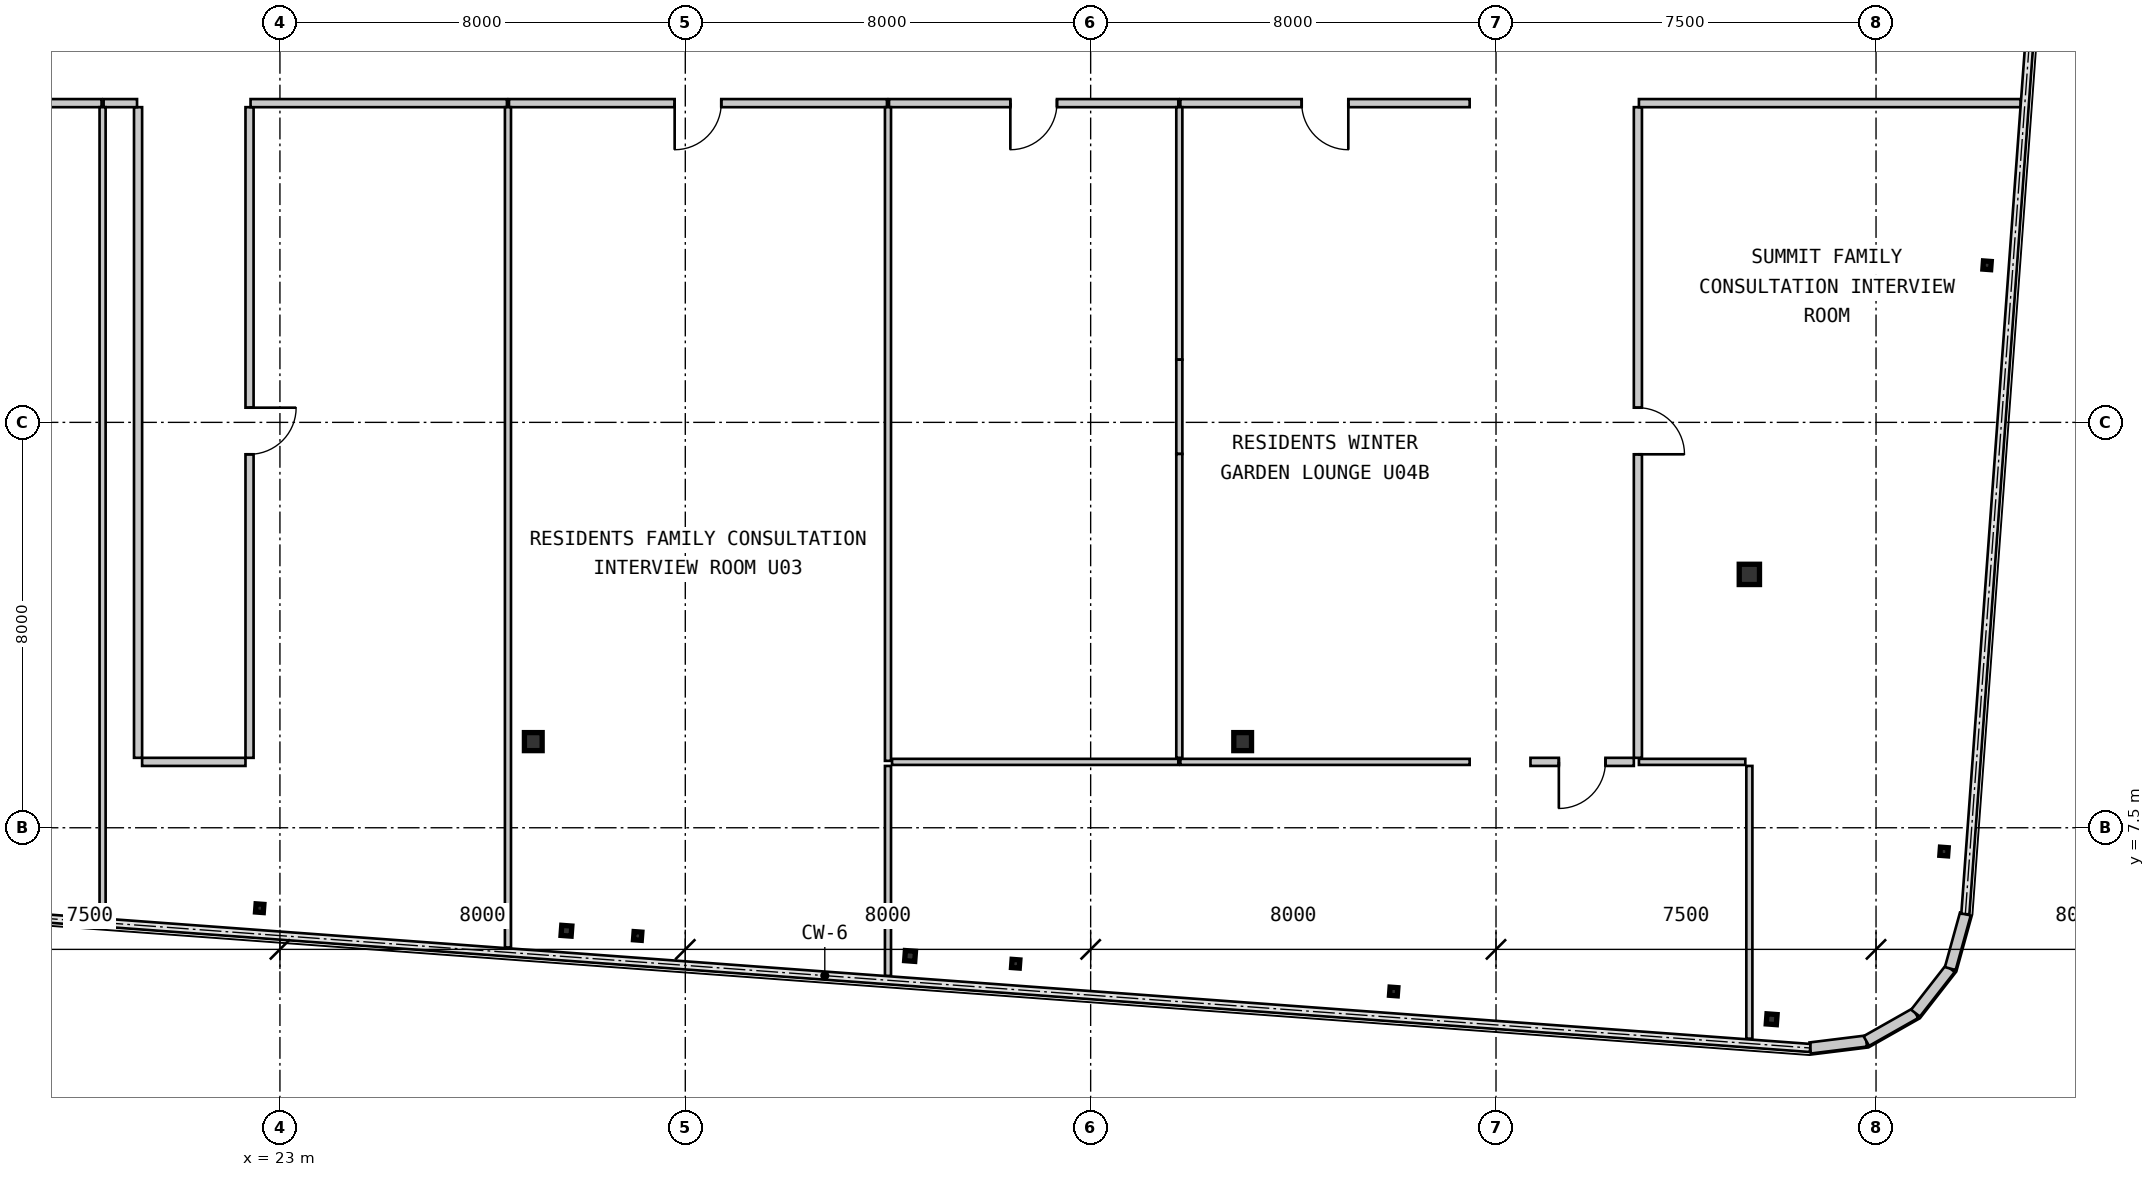
"""IFC4 building model, lengths in metres.
Left out: names, types, materials, properties, quantities, classifications, styles, units other than length and angle.
Written with IfcOpenShell. Run it as: python <this file> out.ifc"""

import sys

from ifc_helpers import new_model, si_unit, direction, frame, frame_2d, origin, origin_2d, place, context, subcontext, project, spatial, rectangle, hollow_rectangle, i_section, extrude, source, transform, mapped, element, fill, save


model = new_model("IFC4")
c1 = context("Model", 3, precision=1e-05, world=origin(), true_north=direction((0.0, 1.0)))
c2 = subcontext(c1, "Body", "Model", "MODEL_VIEW")
j1 = project(units=[si_unit("LENGTHUNIT", "METRE"), si_unit("PLANEANGLEUNIT", "RADIAN")], contexts=[c1])
p1 = place(None, origin())
s1 = spatial("IfcSite", under=j1, at=p1, CompositionType="ELEMENT")
p2 = place(p1, origin())
s2 = spatial("IfcBuilding", under=s1, at=p2, CompositionType="ELEMENT")
p3 = place(p2, frame((0.0, 0.0, 246.05)))
s3 = spatial("IfcBuildingStorey", under=s2, at=p3, CompositionType="ELEMENT", Elevation=246.05)
m1 = source(origin(), c2, "Body", "SweptSolid", [
    extrude(i_section(OverallWidth=0.35, OverallDepth=0.356, WebThickness=0.018, FlangeThickness=0.028, at=origin_2d()), origin(), (0.0, 0.0, 1.0), 3.15),
])
for number, where, z_axis, x_axis in (
    (1, (28.0, 9.2, 0.0), (0.0, 0.0, 1.0), (1.0, 0.0, 0.0)),
    (2, (42.0, 9.2, 0.0), (0.0, 0.0, 1.0), (1.0, 0.0, 0.0)),
):
    element("IfcColumn", number, at=place(p3, frame(where, z_axis=z_axis, x_axis=x_axis)), inside=s3, PredefinedType="COLUMN", context=c2, shape_type="MappedRepresentation", body=[
        mapped(m1, transform((0.0, 0.0, 0.0), scale=1.0)),
    ])
m2 = source(origin(), c2, "Body", "SweptSolid", [
    extrude(hollow_rectangle(XDim=0.4, YDim=0.4, WallThickness=0.016, at=origin_2d()), origin(), (0.0, 0.0, 1.0), 3.15),
])
p4 = place(p3, frame((52.0, 12.5, 0.0), z_axis=(0.0, 0.0, 1.0), x_axis=(1.0, 0.0, 0.0)))
e3 = element("IfcColumn", 3, at=p4, inside=s3, PredefinedType="COLUMN", context=c2, shape_type="MappedRepresentation", body=[
    mapped(m2, transform((0.0, 0.0, 0.0), scale=1.0)),
])
m3 = source(origin(), c2, "Body", "SweptSolid", [
    extrude(i_section(OverallWidth=0.154, OverallDepth=0.162, WebThickness=0.008, FlangeThickness=0.011, at=origin_2d()), origin(), (0.0, 0.0, 1.0), 3.15),
])
for number, where, z_axis, x_axis in (
    (4, (22.601, 5.912, 0.0), (0.0, 0.0, 1.0), (0.997, -0.073, 0.0)),
    (5, (30.061, 5.365, 0.0), (0.0, 0.0, 1.0), (0.997, -0.073, 0.0)),
    (6, (37.521, 4.817, 0.0), (0.0, 0.0, 1.0), (0.997, -0.073, 0.0)),
    (7, (44.98, 4.269, 0.0), (0.0, 0.0, 1.0), (0.997, -0.073, 0.0)),
):
    element("IfcColumn", number, at=place(p3, frame(where, z_axis=z_axis, x_axis=x_axis)), inside=s3, PredefinedType="COLUMN", context=c2, shape_type="MappedRepresentation", body=[
        mapped(m3, transform((0.0, 0.0, 0.0), scale=1.0)),
    ])
m4 = source(origin(), c2, "Body", "SweptSolid", [
    extrude(hollow_rectangle(XDim=0.2, YDim=0.2, WallThickness=0.009, at=origin_2d()), origin(), (0.0, 0.0, 1.0), 3.15),
])
p5 = place(p3, frame((52.44, 3.721, 0.0), z_axis=(0.0, 0.0, 1.0), x_axis=(0.997314477224, -0.073238197128, 0.0)))
e8 = element("IfcColumn", 8, at=p5, inside=s3, PredefinedType="COLUMN", context=c2, shape_type="MappedRepresentation", body=[
    mapped(m4, transform((0.0, 0.0, 0.0), scale=1.0)),
])
for number, where, z_axis, x_axis in (
    (9, (55.842, 7.031, 0.0), (0.0, 0.0, 1.0), (0.997, -0.073, 0.0)),
    (10, (56.691, 18.6, 0.0), (0.0, 0.0, 1.0), (0.997, -0.073, 0.0)),
):
    element("IfcColumn", number, at=place(p3, frame(where, z_axis=z_axis, x_axis=x_axis)), inside=s3, PredefinedType="COLUMN", context=c2, shape_type="MappedRepresentation", body=[
        mapped(m3, transform((0.0, 0.0, 0.0), scale=1.0)),
    ])
for number, where, z_axis, x_axis in (
    (11, (28.654, 5.468, 0.0), (0.0, 0.0, 1.0), (0.997, -0.073, 0.0)),
    (12, (35.436, 4.97, 0.0), (0.0, 0.0, 1.0), (0.997, -0.073, 0.0)),
):
    element("IfcColumn", number, at=place(p3, frame(where, z_axis=z_axis, x_axis=x_axis)), inside=s3, PredefinedType="COLUMN", context=c2, shape_type="MappedRepresentation", body=[
        mapped(m4, transform((0.0, 0.0, 0.0), scale=1.0)),
    ])
m5 = source(origin(), c2, "Body", "SweptSolid", [
    extrude(rectangle(XDim=1.116, YDim=0.22, at=frame_2d((0.558, 0.0))), origin(), (0.0, 0.0, 1.0), 2.93),
])
p6 = place(p3, frame((53.201, 3.154, 0.0), z_axis=(0.0, 0.0, 1.0), x_axis=(0.992438604032, 0.122742076028, 0.0)))
e13 = element("IfcWall", 13, at=p6, inside=s3, PredefinedType="SOLIDWALL", context=c2, shape_type="MappedRepresentation", body=[
    mapped(m5, transform((0.0, 0.0, 0.0), scale=1.0)),
])
m6 = source(origin(), c2, "Body", "SweptSolid", [
    extrude(rectangle(XDim=1.116, YDim=0.22, at=frame_2d((0.558, 0.0))), origin(), (0.0, 0.0, 1.0), 2.93),
])
p7 = place(p3, frame((54.308, 3.291, 0.0), z_axis=(0.0, 0.0, 1.0), x_axis=(0.869893934693, 0.49323882895, 0.0)))
e14 = element("IfcWall", 14, at=p7, inside=s3, PredefinedType="SOLIDWALL", context=c2, shape_type="MappedRepresentation", body=[
    mapped(m6, transform((0.0, 0.0, 0.0), scale=1.0)),
])
for number, where, z_axis, x_axis in (
    (15, (55.279, 3.841, 0.0), (0.0, 0.0, 1.0), (0.615, 0.789, 0.0)),
    (16, (55.965, 4.721, 0.0), (0.0, 0.0, 1.0), (0.266, 0.964, 0.0)),
):
    element("IfcWall", number, at=place(p3, frame(where, z_axis=z_axis, x_axis=x_axis)), inside=s3, PredefinedType="SOLIDWALL", context=c2, shape_type="MappedRepresentation", body=[
        mapped(m5, transform((0.0, 0.0, 0.0), scale=1.0)),
    ])
m7 = source(origin(), c2, "Body", "SweptSolid", [
    extrude(rectangle(XDim=2.04, YDim=0.16, at=frame_2d((1.02, 0.0))), origin(), (0.0, 0.0, 1.0), 2.93),
])
p8 = place(p3, frame((49.72, 8.8, 0.0), z_axis=(0.0, 0.0, 1.0), x_axis=(-1.0, 0.0, 0.0)))
e17 = element("IfcWall", 17, at=p8, inside=s3, PredefinedType="PARTITIONING", context=c2, shape_type="MappedRepresentation", body=[
    mapped(m7, transform((0.0, 0.0, 0.0), scale=1.0)),
])
m8 = source(origin(), c2, "Body", "SweptSolid", [
    extrude(rectangle(XDim=0.92, YDim=2.1, at=frame_2d((0.46, 1.05))), frame((0.0, 0.09, 0.0), z_axis=(0.0, -1.0, 0.0), x_axis=(1.0, 0.0, 0.0)), (0.0, 0.0, 1.0), 0.18),
])
p9 = place(p8, frame((0.56, 0.0, 0.0)))
e18 = element("IfcOpeningElement", 18, at=p9, cuts=e17, PredefinedType="OPENING", context=c2, shape_type="MappedRepresentation", body=[
    mapped(m8, transform((0.0, 0.0, 0.0), scale=1.0)),
])
m9 = source(origin(), c2, "Body", "SweptSolid", [
    extrude(rectangle(XDim=6.786, YDim=0.16, at=frame_2d((3.393, 0.0))), origin(), (0.0, 0.0, 1.0), 2.93),
])
p10 = place(p3, frame((19.48, 21.8, 0.0), z_axis=(0.0, 0.0, 1.0), x_axis=(-1.0, 0.0, 0.0)))
e19 = element("IfcWall", 19, at=p10, inside=s3, PredefinedType="PARTITIONING", context=c2, shape_type="MappedRepresentation", body=[
    mapped(m9, transform((0.0, 0.0, 0.0), scale=1.0)),
])
p11 = place(p10, frame((2.933, 0.0, 0.0)))
e20 = element("IfcOpeningElement", 20, at=p11, cuts=e19, PredefinedType="OPENING", context=c2, shape_type="MappedRepresentation", body=[
    mapped(m8, transform((0.0, 0.0, 0.0), scale=1.0)),
])
m10 = source(origin(), c2, "Body", "SweptSolid", [
    extrude(rectangle(XDim=12.84, YDim=0.16, at=frame_2d((6.42, 0.0))), origin(), (0.0, 0.0, 1.0), 2.93),
])
p12 = place(p3, frame((20.2, 8.88, 0.0), z_axis=(0.0, 0.0, 1.0), x_axis=(0.0, 1.0, 0.0)))
e21 = element("IfcWall", 21, at=p12, inside=s3, PredefinedType="PARTITIONING", context=c2, shape_type="MappedRepresentation", body=[
    mapped(m10, transform((0.0, 0.0, 0.0), scale=1.0)),
])
p13 = place(p3, frame((22.4, 21.72, 0.0), z_axis=(0.0, 0.0, 1.0), x_axis=(0.0, -1.0, 0.0)))
e22 = element("IfcWall", 22, at=p13, inside=s3, PredefinedType="PARTITIONING", context=c2, shape_type="MappedRepresentation", body=[
    mapped(m10, transform((0.0, 0.0, 0.0), scale=1.0)),
])
p14 = place(p13, frame((5.93, 0.0, 0.0)))
e23 = element("IfcOpeningElement", 23, at=p14, cuts=e22, PredefinedType="OPENING", context=c2, shape_type="MappedRepresentation", body=[
    mapped(m8, transform((0.0, 0.0, 0.0), scale=1.0)),
])
m11 = source(origin(), c2, "Body", "SweptSolid", [
    extrude(rectangle(XDim=5.06, YDim=0.16, at=frame_2d((2.53, 0.0))), origin(), (0.0, 0.0, 1.0), 2.93),
])
p15 = place(p3, frame((27.48, 21.8, 0.0), z_axis=(0.0, 0.0, 1.0), x_axis=(-1.0, 0.0, 0.0)))
e24 = element("IfcWall", 24, at=p15, inside=s3, PredefinedType="PARTITIONING", context=c2, shape_type="MappedRepresentation", body=[
    mapped(m11, transform((0.0, 0.0, 0.0), scale=1.0)),
])
p16 = place(p3, frame((22.32, 8.8, 0.0), z_axis=(0.0, 0.0, 1.0), x_axis=(-1.0, 0.0, 0.0)))
e25 = element("IfcWall", 25, at=p16, inside=s3, PredefinedType="PARTITIONING", context=c2, shape_type="MappedRepresentation", body=[
    mapped(m7, transform((0.0, 0.0, 0.0), scale=1.0)),
])
m12 = source(origin(), c2, "Body", "SweptSolid", [
    extrude(rectangle(XDim=0.659, YDim=0.16, at=frame_2d((0.33, 0.0))), origin(), (0.0, 0.0, 1.0), 2.93),
])
p17 = place(p3, frame((20.18, 21.8, 0.0), z_axis=(0.0, 0.0, 1.0), x_axis=(-1.0, 0.0, 0.0)))
e26 = element("IfcWall", 26, at=p17, inside=s3, PredefinedType="PARTITIONING", context=c2, shape_type="MappedRepresentation", body=[
    mapped(m12, transform((0.0, 0.0, 0.0), scale=1.0)),
])
m13 = source(origin(), c2, "Body", "SweptSolid", [
    extrude(rectangle(XDim=7.459, YDim=0.16, at=frame_2d((3.73, 0.0))), origin(), (0.0, 0.0, 1.0), 2.93),
])
p18 = place(p3, frame((34.98, 21.8, 0.0), z_axis=(0.0, 0.0, 1.0), x_axis=(-1.0, 0.0, 0.0)))
e27 = element("IfcWall", 27, at=p18, inside=s3, PredefinedType="PARTITIONING", context=c2, shape_type="MappedRepresentation", body=[
    mapped(m13, transform((0.0, 0.0, 0.0), scale=1.0)),
])
p19 = place(p18, frame((3.27, 0.0, 0.0)))
e28 = element("IfcOpeningElement", 28, at=p19, cuts=e27, PredefinedType="OPENING", context=c2, shape_type="MappedRepresentation", body=[
    mapped(m8, transform((0.0, 0.0, 0.0), scale=1.0)),
])
m14 = source(origin(), c2, "Body", "SweptSolid", [
    extrude(rectangle(XDim=5.709, YDim=0.16, at=frame_2d((2.855, 0.0))), origin(), (0.0, 0.0, 1.0), 2.93),
])
p20 = place(p3, frame((40.73, 21.8, 0.0), z_axis=(0.0, 0.0, 1.0), x_axis=(-1.0, 0.0, 0.0)))
e29 = element("IfcWall", 29, at=p20, inside=s3, PredefinedType="PARTITIONING", context=c2, shape_type="MappedRepresentation", body=[
    mapped(m14, transform((0.0, 0.0, 0.0), scale=1.0)),
])
p21 = place(p20, frame((2.395, 0.0, 0.0)))
e30 = element("IfcOpeningElement", 30, at=p21, cuts=e29, PredefinedType="OPENING", context=c2, shape_type="MappedRepresentation", body=[
    mapped(m8, transform((0.0, 0.0, 0.0), scale=1.0)),
])
p22 = place(p3, frame((46.48, 21.8, 0.0), z_axis=(0.0, 0.0, 1.0), x_axis=(-1.0, 0.0, 0.0)))
e31 = element("IfcWall", 31, at=p22, inside=s3, PredefinedType="PARTITIONING", context=c2, shape_type="MappedRepresentation", body=[
    mapped(m14, transform((0.0, 0.0, 0.0), scale=1.0)),
])
p23 = place(p22, frame((2.395, 0.0, 0.0)))
e32 = element("IfcOpeningElement", 32, at=p23, cuts=e31, PredefinedType="OPENING", context=c2, shape_type="MappedRepresentation", body=[
    mapped(m8, transform((0.0, 0.0, 0.0), scale=1.0)),
])
p24 = place(p3, frame((49.8, 21.72, 0.0), z_axis=(0.0, 0.0, 1.0), x_axis=(0.0, -1.0, 0.0)))
e33 = element("IfcWall", 33, at=p24, inside=s3, PredefinedType="PARTITIONING", context=c2, shape_type="MappedRepresentation", body=[
    mapped(m10, transform((0.0, 0.0, 0.0), scale=1.0)),
])
p25 = place(p24, frame((5.93, 0.0, 0.0)))
e34 = element("IfcOpeningElement", 34, at=p25, cuts=e33, PredefinedType="OPENING", context=c2, shape_type="MappedRepresentation", body=[
    mapped(m8, transform((0.0, 0.0, 0.0), scale=1.0)),
])
m15 = source(origin(), c2, "Body", "SweptSolid", [
    extrude(rectangle(XDim=7.533, YDim=0.16, at=frame_2d((3.767, 0.0))), origin(), (0.0, 0.0, 1.0), 2.93),
])
p26 = place(p3, frame((57.353, 21.8, 0.0), z_axis=(0.0, 0.0, 1.0), x_axis=(-1.0, 0.0, 0.0)))
e35 = element("IfcWall", 35, at=p26, inside=s3, PredefinedType="PARTITIONING", context=c2, shape_type="MappedRepresentation", body=[
    mapped(m15, transform((0.0, 0.0, 0.0), scale=1.0)),
])
m16 = source(origin(), c2, "Body", "SweptSolid", [
    extrude(rectangle(XDim=4.145, YDim=0.12, at=frame_2d((2.073, 0.0))), origin(), (0.0, 0.0, 1.0), 2.93),
])
p27 = place(p3, frame((35.0, 4.575, 0.0), z_axis=(0.0, 0.0, 1.0), x_axis=(0.0, 1.0, 0.0)))
e36 = element("IfcWall", 36, at=p27, inside=s3, PredefinedType="PARTITIONING", context=c2, shape_type="MappedRepresentation", body=[
    mapped(m16, transform((0.0, 0.0, 0.0), scale=1.0)),
])
m17 = source(origin(), c2, "Body", "SweptSolid", [
    extrude(rectangle(XDim=5.65, YDim=0.12, at=frame_2d((2.825, 0.0))), origin(), (0.0, 0.0, 1.0), 2.93),
])
p28 = place(p3, frame((35.08, 8.8, 0.0), z_axis=(0.0, 0.0, 1.0), x_axis=(1.0, 0.0, 0.0)))
e37 = element("IfcWall", 37, at=p28, inside=s3, PredefinedType="PARTITIONING", context=c2, shape_type="MappedRepresentation", body=[
    mapped(m17, transform((0.0, 0.0, 0.0), scale=1.0)),
])
m18 = source(origin(), c2, "Body", "SweptSolid", [
    extrude(rectangle(XDim=5.709, YDim=0.12, at=frame_2d((2.855, 0.0))), origin(), (0.0, 0.0, 1.0), 2.93),
])
p29 = place(p3, frame((40.77, 8.8, 0.0), z_axis=(0.0, 0.0, 1.0), x_axis=(1.0, 0.0, 0.0)))
e38 = element("IfcWall", 38, at=p29, inside=s3, PredefinedType="PARTITIONING", context=c2, shape_type="MappedRepresentation", body=[
    mapped(m18, transform((0.0, 0.0, 0.0), scale=1.0)),
])
m19 = source(origin(), c2, "Body", "SweptSolid", [
    extrude(rectangle(XDim=5.382, YDim=0.12, at=frame_2d((2.691, 0.0))), origin(), (0.0, 0.0, 1.0), 2.93),
])
p30 = place(p3, frame((52.0, 8.72, 0.0), z_axis=(0.0, 0.0, 1.0), x_axis=(0.0, -1.0, 0.0)))
e39 = element("IfcWall", 39, at=p30, inside=s3, PredefinedType="PARTITIONING", context=c2, shape_type="MappedRepresentation", body=[
    mapped(m19, transform((0.0, 0.0, 0.0), scale=1.0)),
])
m20 = source(origin(), c2, "Body", "SweptSolid", [
    extrude(rectangle(XDim=2.1, YDim=0.12, at=frame_2d((1.05, 0.0))), origin(), (0.0, 0.0, 1.0), 2.93),
])
p31 = place(p3, frame((49.82, 8.8, 0.0), z_axis=(0.0, 0.0, 1.0), x_axis=(1.0, 0.0, 0.0)))
e40 = element("IfcWall", 40, at=p31, inside=s3, PredefinedType="PARTITIONING", context=c2, shape_type="MappedRepresentation", body=[
    mapped(m20, transform((0.0, 0.0, 0.0), scale=1.0)),
])
m21 = source(origin(), c2, "Body", "SweptSolid", [
    extrude(rectangle(XDim=15.995, YDim=0.12, at=frame_2d((7.998, 0.0))), origin(), (0.0, 0.0, 1.0), 2.93),
])
p32 = place(p3, frame((19.5, 21.72, 0.0), z_axis=(0.0, 0.0, 1.0), x_axis=(0.0, -1.0, 0.0)))
e41 = element("IfcWall", 41, at=p32, inside=s3, PredefinedType="PARTITIONING", context=c2, shape_type="MappedRepresentation", body=[
    mapped(m21, transform((0.0, 0.0, 0.0), scale=1.0)),
])
m22 = source(origin(), c2, "Body", "SweptSolid", [
    extrude(rectangle(XDim=16.583, YDim=0.12, at=frame_2d((8.291, 0.0))), origin(), (0.0, 0.0, 1.0), 2.93),
])
p33 = place(p3, frame((27.5, 21.72, 0.0), z_axis=(0.0, 0.0, 1.0), x_axis=(0.0, -1.0, 0.0)))
e42 = element("IfcWall", 42, at=p33, inside=s3, PredefinedType="PARTITIONING", context=c2, shape_type="MappedRepresentation", body=[
    mapped(m22, transform((0.0, 0.0, 0.0), scale=1.0)),
])
m23 = source(origin(), c2, "Body", "SweptSolid", [
    extrude(rectangle(XDim=12.9, YDim=0.12, at=frame_2d((6.45, 0.0))), origin(), (0.0, 0.0, 1.0), 2.93),
])
p34 = place(p3, frame((35.0, 21.72, 0.0), z_axis=(0.0, 0.0, 1.0), x_axis=(0.0, -1.0, 0.0)))
e43 = element("IfcWall", 43, at=p34, inside=s3, PredefinedType="PARTITIONING", context=c2, shape_type="MappedRepresentation", body=[
    mapped(m23, transform((0.0, 0.0, 0.0), scale=1.0)),
])
m24 = source(origin(), c2, "Body", "SweptSolid", [
    extrude(rectangle(XDim=4.982, YDim=0.12, at=frame_2d((2.491, 0.0))), origin(), (0.0, 0.0, 1.0), 2.93),
])
p35 = place(p3, frame((40.75, 21.72, 0.0), z_axis=(0.0, 0.0, 1.0), x_axis=(0.0, -1.0, 0.0)))
e44 = element("IfcWall", 44, at=p35, inside=s3, PredefinedType="PARTITIONING", context=c2, shape_type="MappedRepresentation", body=[
    mapped(m24, transform((0.0, 0.0, 0.0), scale=1.0)),
])
m25 = source(origin(), c2, "Body", "SweptSolid", [
    extrude(rectangle(XDim=1.861, YDim=0.12, at=frame_2d((0.93, 0.0))), origin(), (0.0, 0.0, 1.0), 2.328),
])
p36 = place(p3, frame((40.75, 16.738, 0.0), z_axis=(0.0, 0.0, 1.0), x_axis=(0.0, -1.0, 0.0)))
e45 = element("IfcWall", 45, at=p36, inside=s3, PredefinedType="PARTITIONING", context=c2, shape_type="MappedRepresentation", body=[
    mapped(m25, transform((0.0, 0.0, 0.0), scale=1.0)),
])
m26 = source(origin(), c2, "Body", "SweptSolid", [
    extrude(rectangle(XDim=5.997, YDim=0.12, at=frame_2d((2.999, 0.0))), origin(), (0.0, 0.0, 1.0), 2.93),
])
p37 = place(p3, frame((40.75, 14.877, 0.0), z_axis=(0.0, 0.0, 1.0), x_axis=(0.0, -1.0, 0.0)))
e46 = element("IfcWall", 46, at=p37, inside=s3, PredefinedType="PARTITIONING", context=c2, shape_type="MappedRepresentation", body=[
    mapped(m26, transform((0.0, 0.0, 0.0), scale=1.0)),
])
m27 = source(origin(), c2, "Body", "SweptSolid", [
    extrude(rectangle(XDim=0.92, YDim=2.1, at=frame_2d((0.46, 1.05))), frame((0.0, 0.025, 0.0), z_axis=(0.0, -1.0, 0.0), x_axis=(1.0, 0.0, 0.0)), (0.0, 0.0, 1.0), 0.05),
])
p38 = place(p9, origin())
e47 = element("IfcDoor", 47, at=p38, inside=s3, OperationType="SINGLE_SWING_RIGHT", PredefinedType="DOOR", context=c2, shape_type="MappedRepresentation", body=[
    mapped(m27, transform((0.0, 0.0, 0.0), scale=1.0)),
])
fill(e18, e47)
p39 = place(p14, origin())
e48 = element("IfcDoor", 48, at=p39, inside=s3, OperationType="SINGLE_SWING_LEFT", PredefinedType="DOOR", context=c2, shape_type="MappedRepresentation", body=[
    mapped(m27, transform((0.0, 0.0, 0.0), scale=1.0)),
])
fill(e23, e48)
p40 = place(p19, origin())
e49 = element("IfcDoor", 49, at=p40, inside=s3, OperationType="SINGLE_SWING_RIGHT", PredefinedType="DOOR", context=c2, shape_type="MappedRepresentation", body=[
    mapped(m27, transform((0.0, 0.0, 0.0), scale=1.0)),
])
fill(e28, e49)
p41 = place(p21, origin())
e50 = element("IfcDoor", 50, at=p41, inside=s3, OperationType="SINGLE_SWING_RIGHT", PredefinedType="DOOR", context=c2, shape_type="MappedRepresentation", body=[
    mapped(m27, transform((0.0, 0.0, 0.0), scale=1.0)),
])
fill(e30, e50)
p42 = place(p23, origin())
e51 = element("IfcDoor", 51, at=p42, inside=s3, OperationType="SINGLE_SWING_LEFT", PredefinedType="DOOR", context=c2, shape_type="MappedRepresentation", body=[
    mapped(m27, transform((0.0, 0.0, 0.0), scale=1.0)),
])
fill(e32, e51)
p43 = place(p25, origin())
e52 = element("IfcDoor", 52, at=p43, inside=s3, OperationType="SINGLE_SWING_RIGHT", PredefinedType="DOOR", context=c2, shape_type="MappedRepresentation", body=[
    mapped(m27, transform((0.0, 0.0, 0.0), scale=1.0)),
])
fill(e34, e52)
save(model, sys.argv[1])
